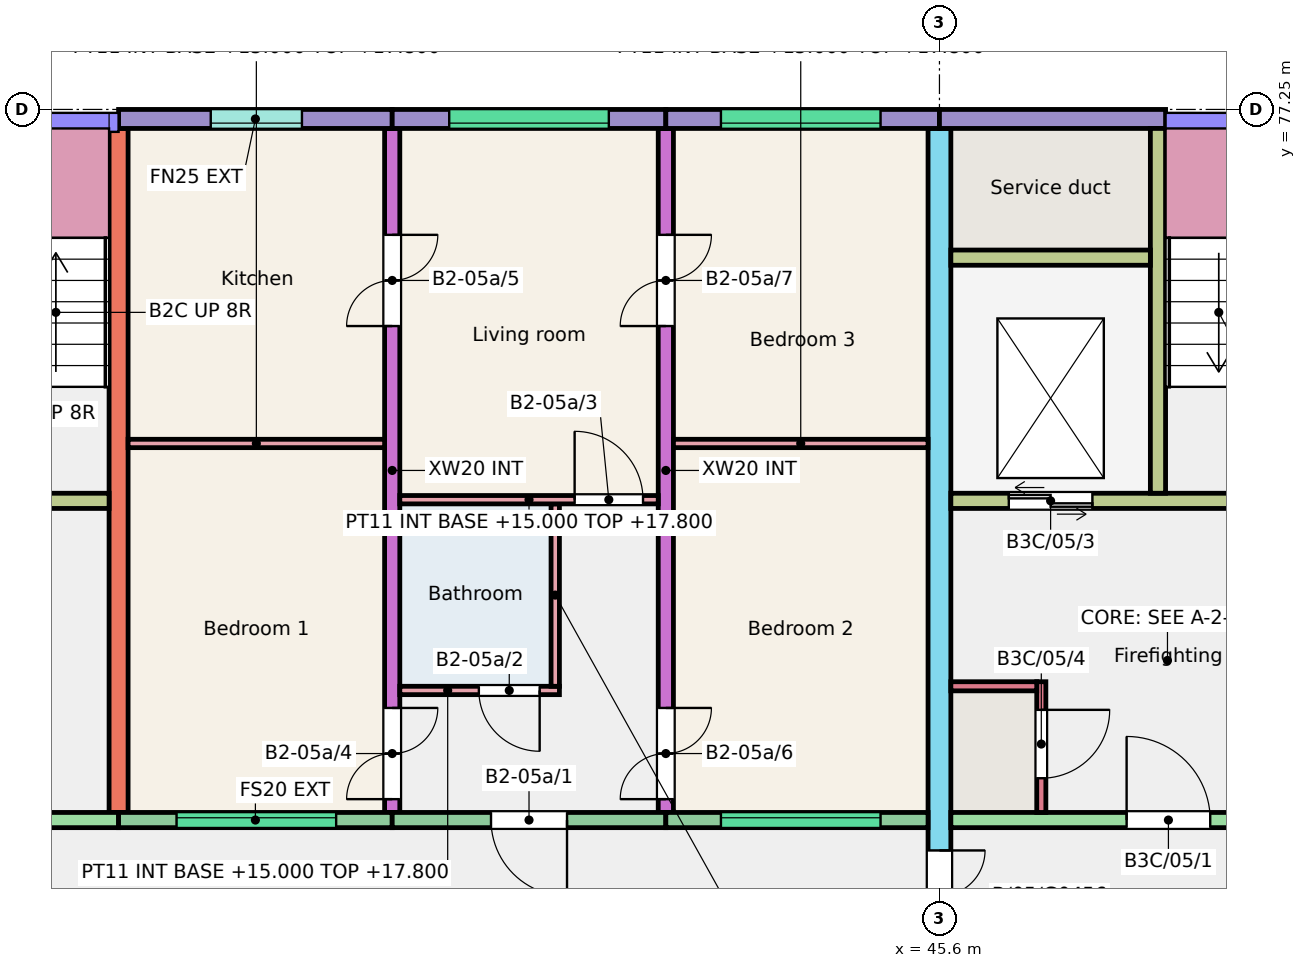
"""IFC4 building model, lengths in metres.
Left out: names, types, materials, properties, quantities, classifications, styles, units other than length and angle.
Written with IfcOpenShell. Run it as: python <this file> out.ifc"""

import sys

from ifc_helpers import new_model, si_unit, direction, frame, frame_2d, origin, place, context, subcontext, project, spatial, rectangle, extrude, element, fill, save


model = new_model("IFC4")
c1 = context("Model", 3, precision=1e-05, world=origin(), true_north=direction((0.0, 1.0)))
c2 = subcontext(c1, "Body", "Model", "MODEL_VIEW")
j1 = project(units=[si_unit("LENGTHUNIT", "METRE"), si_unit("PLANEANGLEUNIT", "RADIAN")], contexts=[c1])
p1 = place(None, origin())
s1 = spatial("IfcSite", under=j1, at=p1, CompositionType="ELEMENT")
p2 = place(p1, origin())
s2 = spatial("IfcBuilding", under=s1, at=p2, CompositionType="ELEMENT")
p3 = place(p2, frame((0.0, 0.0, 15.0)))
s3 = spatial("IfcBuildingStorey", under=s2, at=p3, CompositionType="ELEMENT", Elevation=15.0)
p4 = place(p3, frame((34.8, 68.0, 0.0), z_axis=(0.0, 0.0, 1.0), x_axis=(0.0, 1.0, 0.0)))
e1 = element("IfcWall", 1, at=p4, inside=s3, PredefinedType="SHEAR", context=c2, shape_type="SweptSolid", body=[
    extrude(rectangle(XDim=9.0, YDim=0.25, at=frame_2d((4.5, 0.0))), origin(), (0.0, 0.0, 1.0), 3.0),
])
p5 = place(p3, frame((38.4, 68.0, 0.0), z_axis=(0.0, 0.0, 1.0), x_axis=(0.0, 1.0, 0.0)))
e2 = element("IfcWall", 2, at=p5, inside=s3, PredefinedType="SHEAR", context=c2, shape_type="SweptSolid", body=[
    extrude(rectangle(XDim=9.0, YDim=0.2, at=frame_2d((4.5, 0.0))), origin(), (0.0, 0.0, 1.0), 3.0),
])
p6 = place(p5, frame((0.175, 0.0, 0.0)))
e3 = element("IfcOpeningElement", 3, at=p6, cuts=e2, PredefinedType="OPENING", context=c2, shape_type="SweptSolid", body=[
    extrude(rectangle(XDim=1.2, YDim=2.1, at=frame_2d((0.6, 1.05))), frame((0.0, 0.11, 0.0), z_axis=(0.0, -1.0, 0.0), x_axis=(1.0, 0.0, 0.0)), (0.0, 0.0, 1.0), 0.22),
])
p7 = place(p5, frame((6.4, 0.0, 0.0)))
e4 = element("IfcOpeningElement", 4, at=p7, cuts=e2, PredefinedType="OPENING", context=c2, shape_type="SweptSolid", body=[
    extrude(rectangle(XDim=1.2, YDim=2.1, at=frame_2d((0.6, 1.05))), frame((0.0, 0.11, 0.0), z_axis=(0.0, -1.0, 0.0), x_axis=(1.0, 0.0, 0.0)), (0.0, 0.0, 1.0), 0.22),
])
p8 = place(p3, frame((42.0, 68.0, 0.0), z_axis=(0.0, 0.0, 1.0), x_axis=(0.0, 1.0, 0.0)))
e5 = element("IfcWall", 5, at=p8, inside=s3, PredefinedType="SHEAR", context=c2, shape_type="SweptSolid", body=[
    extrude(rectangle(XDim=9.0, YDim=0.2, at=frame_2d((4.5, 0.0))), origin(), (0.0, 0.0, 1.0), 3.0),
])
p9 = place(p8, frame((0.175, 0.0, 0.0)))
e6 = element("IfcOpeningElement", 6, at=p9, cuts=e5, PredefinedType="OPENING", context=c2, shape_type="SweptSolid", body=[
    extrude(rectangle(XDim=1.2, YDim=2.1, at=frame_2d((0.6, 1.05))), frame((0.0, 0.11, 0.0), z_axis=(0.0, -1.0, 0.0), x_axis=(1.0, 0.0, 0.0)), (0.0, 0.0, 1.0), 0.22),
])
p10 = place(p8, frame((6.4, 0.0, 0.0)))
e7 = element("IfcOpeningElement", 7, at=p10, cuts=e5, PredefinedType="OPENING", context=c2, shape_type="SweptSolid", body=[
    extrude(rectangle(XDim=1.2, YDim=2.1, at=frame_2d((0.6, 1.05))), frame((0.0, 0.11, 0.0), z_axis=(0.0, -1.0, 0.0), x_axis=(1.0, 0.0, 0.0)), (0.0, 0.0, 1.0), 0.22),
])
p11 = place(p3, frame((45.6, 66.0, 0.0), z_axis=(0.0, 0.0, 1.0), x_axis=(0.0, 1.0, 0.0)))
e8 = element("IfcWall", 8, at=p11, inside=s3, PredefinedType="SHEAR", context=c2, shape_type="SweptSolid", body=[
    extrude(rectangle(XDim=11.0, YDim=0.3, at=frame_2d((5.5, 0.0))), origin(), (0.0, 0.0, 1.0), 3.0),
])
p12 = place(p11, frame((0.3, 0.0, 0.0)))
e9 = element("IfcOpeningElement", 9, at=p12, cuts=e8, PredefinedType="OPENING", context=c2, shape_type="SweptSolid", body=[
    extrude(rectangle(XDim=1.2, YDim=2.1, at=frame_2d((0.6, 1.05))), frame((0.0, 0.16, 0.0), z_axis=(0.0, -1.0, 0.0), x_axis=(1.0, 0.0, 0.0)), (0.0, 0.0, 1.0), 0.32),
])
p13 = place(p3, frame((28.95, 67.9, 0.0), z_axis=(0.0, 0.0, 1.0), x_axis=(1.0, 0.0, 0.0)))
e10 = element("IfcWall", 10, at=p13, inside=s3, PredefinedType="SHEAR", context=c2, shape_type="SweptSolid", body=[
    extrude(rectangle(XDim=5.85, YDim=0.2, at=frame_2d((2.925, 0.0))), origin(), (0.0, 0.0, 1.0), 3.0),
])
p14 = place(p13, frame((2.312, 0.0, 0.0)))
e11 = element("IfcOpeningElement", 11, at=p14, cuts=e10, PredefinedType="OPENING", context=c2, shape_type="SweptSolid", body=[
    extrude(rectangle(XDim=1.1, YDim=2.1, at=frame_2d((0.55, 1.05))), frame((0.0, 0.11, 0.0), z_axis=(0.0, -1.0, 0.0), x_axis=(1.0, 0.0, 0.0)), (0.0, 0.0, 1.0), 0.22),
])
p15 = place(p3, frame((28.95, 72.1, 0.0), z_axis=(0.0, 0.0, 1.0), x_axis=(1.0, 0.0, 0.0)))
e12 = element("IfcWall", 12, at=p15, inside=s3, PredefinedType="SHEAR", context=c2, shape_type="SweptSolid", body=[
    extrude(rectangle(XDim=5.725, YDim=0.2, at=frame_2d((2.863, 0.0))), origin(), (0.0, 0.0, 1.0), 3.0),
])
p16 = place(p15, frame((3.775, 0.0, 0.0)))
e13 = element("IfcOpeningElement", 13, at=p16, cuts=e12, PredefinedType="OPENING", context=c2, shape_type="SweptSolid", body=[
    extrude(rectangle(XDim=1.0, YDim=2.1, at=frame_2d((0.5, 1.05))), frame((0.0, 0.11, 0.0), z_axis=(0.0, -1.0, 0.0), x_axis=(1.0, 0.0, 0.0)), (0.0, 0.0, 1.0), 0.22),
])
p17 = place(p15, frame((0.762, 0.0, 0.0)))
e14 = element("IfcOpeningElement", 14, at=p17, cuts=e12, PredefinedType="OPENING", context=c2, shape_type="SweptSolid", body=[
    extrude(rectangle(XDim=1.1, YDim=2.1, at=frame_2d((0.55, 1.05))), frame((0.0, 0.11, 0.0), z_axis=(0.0, -1.0, 0.0), x_axis=(1.0, 0.0, 0.0)), (0.0, 0.0, 1.0), 0.22),
])
p18 = place(p3, frame((34.8, 77.125, 0.0), z_axis=(0.0, 0.0, 1.0), x_axis=(1.0, 0.0, 0.0)))
e15 = element("IfcWall", 15, at=p18, inside=s3, PredefinedType="SOLIDWALL", context=c2, shape_type="SweptSolid", body=[
    extrude(rectangle(XDim=3.6, YDim=0.25, at=frame_2d((1.8, 0.0))), origin(), (0.0, 0.0, 1.0), 3.0),
])
p19 = place(p18, frame((1.212, 0.0, 1.1)))
e16 = element("IfcOpeningElement", 16, at=p19, cuts=e15, PredefinedType="OPENING", context=c2, shape_type="SweptSolid", body=[
    extrude(rectangle(XDim=1.2, YDim=1.3, at=frame_2d((0.6, 0.65))), frame((0.0, 0.135, 0.0), z_axis=(0.0, -1.0, 0.0), x_axis=(1.0, 0.0, 0.0)), (0.0, 0.0, 1.0), 0.27),
])
p20 = place(p3, frame((34.8, 67.9, 0.0), z_axis=(0.0, 0.0, 1.0), x_axis=(1.0, 0.0, 0.0)))
e17 = element("IfcWall", 17, at=p20, inside=s3, PredefinedType="SOLIDWALL", context=c2, shape_type="SweptSolid", body=[
    extrude(rectangle(XDim=3.6, YDim=0.2, at=frame_2d((1.8, 0.0))), origin(), (0.0, 0.0, 1.0), 3.0),
])
p21 = place(p20, frame((0.762, 0.0, 1.2)))
e18 = element("IfcOpeningElement", 18, at=p21, cuts=e17, PredefinedType="OPENING", context=c2, shape_type="SweptSolid", body=[
    extrude(rectangle(XDim=2.1, YDim=1.2, at=frame_2d((1.05, 0.6))), frame((0.0, 0.11, 0.0), z_axis=(0.0, -1.0, 0.0), x_axis=(1.0, 0.0, 0.0)), (0.0, 0.0, 1.0), 0.22),
])
p22 = place(p3, frame((38.4, 77.125, 0.0), z_axis=(0.0, 0.0, 1.0), x_axis=(1.0, 0.0, 0.0)))
e19 = element("IfcWall", 19, at=p22, inside=s3, PredefinedType="SOLIDWALL", context=c2, shape_type="SweptSolid", body=[
    extrude(rectangle(XDim=3.6, YDim=0.25, at=frame_2d((1.8, 0.0))), origin(), (0.0, 0.0, 1.0), 3.0),
])
p23 = place(p22, frame((0.75, 0.0, 1.2)))
e20 = element("IfcOpeningElement", 20, at=p23, cuts=e19, PredefinedType="OPENING", context=c2, shape_type="SweptSolid", body=[
    extrude(rectangle(XDim=2.1, YDim=1.2, at=frame_2d((1.05, 0.6))), frame((0.0, 0.135, 0.0), z_axis=(0.0, -1.0, 0.0), x_axis=(1.0, 0.0, 0.0)), (0.0, 0.0, 1.0), 0.27),
])
p24 = place(p3, frame((38.4, 67.9, 0.0), z_axis=(0.0, 0.0, 1.0), x_axis=(1.0, 0.0, 0.0)))
e21 = element("IfcWall", 21, at=p24, inside=s3, PredefinedType="SOLIDWALL", context=c2, shape_type="SweptSolid", body=[
    extrude(rectangle(XDim=3.6, YDim=0.2, at=frame_2d((1.8, 0.0))), origin(), (0.0, 0.0, 1.0), 3.0),
])
p25 = place(p24, frame((1.3, 0.0, 0.0)))
e22 = element("IfcOpeningElement", 22, at=p25, cuts=e21, PredefinedType="OPENING", context=c2, shape_type="SweptSolid", body=[
    extrude(rectangle(XDim=1.0, YDim=2.1, at=frame_2d((0.5, 1.05))), frame((0.0, 0.11, 0.0), z_axis=(0.0, -1.0, 0.0), x_axis=(1.0, 0.0, 0.0)), (0.0, 0.0, 1.0), 0.22),
])
p26 = place(p3, frame((42.0, 77.125, 0.0), z_axis=(0.0, 0.0, 1.0), x_axis=(1.0, 0.0, 0.0)))
e23 = element("IfcWall", 23, at=p26, inside=s3, PredefinedType="SOLIDWALL", context=c2, shape_type="SweptSolid", body=[
    extrude(rectangle(XDim=3.6, YDim=0.25, at=frame_2d((1.8, 0.0))), origin(), (0.0, 0.0, 1.0), 3.0),
])
p27 = place(p26, frame((0.725, 0.0, 1.2)))
e24 = element("IfcOpeningElement", 24, at=p27, cuts=e23, PredefinedType="OPENING", context=c2, shape_type="SweptSolid", body=[
    extrude(rectangle(XDim=2.1, YDim=1.2, at=frame_2d((1.05, 0.6))), frame((0.0, 0.135, 0.0), z_axis=(0.0, -1.0, 0.0), x_axis=(1.0, 0.0, 0.0)), (0.0, 0.0, 1.0), 0.27),
])
p28 = place(p3, frame((42.0, 67.9, 0.0), z_axis=(0.0, 0.0, 1.0), x_axis=(1.0, 0.0, 0.0)))
e25 = element("IfcWall", 25, at=p28, inside=s3, PredefinedType="SOLIDWALL", context=c2, shape_type="SweptSolid", body=[
    extrude(rectangle(XDim=3.45, YDim=0.2, at=frame_2d((1.725, 0.0))), origin(), (0.0, 0.0, 1.0), 3.0),
])
p29 = place(p28, frame((0.725, 0.0, 1.2)))
e26 = element("IfcOpeningElement", 26, at=p29, cuts=e25, PredefinedType="OPENING", context=c2, shape_type="SweptSolid", body=[
    extrude(rectangle(XDim=2.1, YDim=1.2, at=frame_2d((1.05, 0.6))), frame((0.0, 0.11, 0.0), z_axis=(0.0, -1.0, 0.0), x_axis=(1.0, 0.0, 0.0)), (0.0, 0.0, 1.0), 0.22),
])
p30 = place(p3, frame((45.6, 77.125, 0.0), z_axis=(0.0, 0.0, 1.0), x_axis=(1.0, 0.0, 0.0)))
e27 = element("IfcWall", 27, at=p30, inside=s3, PredefinedType="SOLIDWALL", context=c2, shape_type="SweptSolid", body=[
    extrude(rectangle(XDim=2.975, YDim=0.25, at=frame_2d((1.487, 0.0))), origin(), (0.0, 0.0, 1.0), 3.0),
])
p31 = place(p3, frame((45.75, 67.9, 0.0), z_axis=(0.0, 0.0, 1.0), x_axis=(1.0, 0.0, 0.0)))
e28 = element("IfcWall", 28, at=p31, inside=s3, PredefinedType="SHEAR", context=c2, shape_type="SweptSolid", body=[
    extrude(rectangle(XDim=5.85, YDim=0.2, at=frame_2d((2.925, 0.0))), origin(), (0.0, 0.0, 1.0), 3.0),
])
p32 = place(p31, frame((2.312, 0.0, 0.0)))
e29 = element("IfcOpeningElement", 29, at=p32, cuts=e28, PredefinedType="OPENING", context=c2, shape_type="SweptSolid", body=[
    extrude(rectangle(XDim=1.1, YDim=2.1, at=frame_2d((0.55, 1.05))), frame((0.0, 0.11, 0.0), z_axis=(0.0, -1.0, 0.0), x_axis=(1.0, 0.0, 0.0)), (0.0, 0.0, 1.0), 0.22),
])
p33 = place(p3, frame((45.75, 72.1, 0.0), z_axis=(0.0, 0.0, 1.0), x_axis=(1.0, 0.0, 0.0)))
e30 = element("IfcWall", 30, at=p33, inside=s3, PredefinedType="SHEAR", context=c2, shape_type="SweptSolid", body=[
    extrude(rectangle(XDim=5.725, YDim=0.2, at=frame_2d((2.863, 0.0))), origin(), (0.0, 0.0, 1.0), 3.0),
])
p34 = place(p33, frame((3.775, 0.0, 0.0)))
e31 = element("IfcOpeningElement", 31, at=p34, cuts=e30, PredefinedType="OPENING", context=c2, shape_type="SweptSolid", body=[
    extrude(rectangle(XDim=1.0, YDim=2.1, at=frame_2d((0.5, 1.05))), frame((0.0, 0.11, 0.0), z_axis=(0.0, -1.0, 0.0), x_axis=(1.0, 0.0, 0.0)), (0.0, 0.0, 1.0), 0.22),
])
p35 = place(p33, frame((0.762, 0.0, 0.0)))
e32 = element("IfcOpeningElement", 32, at=p35, cuts=e30, PredefinedType="OPENING", context=c2, shape_type="SweptSolid", body=[
    extrude(rectangle(XDim=1.1, YDim=2.1, at=frame_2d((0.55, 1.05))), frame((0.0, 0.11, 0.0), z_axis=(0.0, -1.0, 0.0), x_axis=(1.0, 0.0, 0.0)), (0.0, 0.0, 1.0), 0.22),
])
p36 = place(p3, frame((48.475, 72.2, 0.0), z_axis=(0.0, 0.0, 1.0), x_axis=(0.0, 1.0, 0.0)))
e33 = element("IfcWall", 33, at=p36, inside=s3, PredefinedType="SHEAR", context=c2, shape_type="SweptSolid", body=[
    extrude(rectangle(XDim=4.8, YDim=0.2, at=frame_2d((2.4, 0.0))), origin(), (0.0, 0.0, 1.0), 3.0),
])
p37 = place(p3, frame((45.75, 75.3, 0.0), z_axis=(0.0, 0.0, 1.0), x_axis=(1.0, 0.0, 0.0)))
e34 = element("IfcWall", 34, at=p37, inside=s3, PredefinedType="SHEAR", context=c2, shape_type="SweptSolid", body=[
    extrude(rectangle(XDim=2.625, YDim=0.2, at=frame_2d((1.312, 0.0))), origin(), (0.0, 0.0, 1.0), 3.0),
])
p38 = place(p3, frame((46.94, 68.0, 0.0), z_axis=(0.0, 0.0, 1.0), x_axis=(0.0, 1.0, 0.0)))
e35 = element("IfcWall", 35, at=p38, inside=s3, PredefinedType="SHEAR", context=c2, shape_type="SweptSolid", body=[
    extrude(rectangle(XDim=1.72, YDim=0.12, at=frame_2d((0.86, 0.0))), origin(), (0.0, 0.0, 1.0), 3.0),
])
p39 = place(p38, frame((0.45, 0.0, 0.0)))
e36 = element("IfcOpeningElement", 36, at=p39, cuts=e35, PredefinedType="OPENING", context=c2, shape_type="SweptSolid", body=[
    extrude(rectangle(XDim=0.9, YDim=2.1, at=frame_2d((0.45, 1.05))), frame((0.0, 0.07, 0.0), z_axis=(0.0, -1.0, 0.0), x_axis=(1.0, 0.0, 0.0)), (0.0, 0.0, 1.0), 0.14),
])
p40 = place(p3, frame((45.75, 69.66, 0.0), z_axis=(0.0, 0.0, 1.0), x_axis=(1.0, 0.0, 0.0)))
e37 = element("IfcWall", 37, at=p40, inside=s3, PredefinedType="SHEAR", context=c2, shape_type="SweptSolid", body=[
    extrude(rectangle(XDim=1.13, YDim=0.12, at=frame_2d((0.565, 0.0))), origin(), (0.0, 0.0, 1.0), 3.0),
])
p41 = place(p3, frame((38.5, 69.605, 0.0), z_axis=(0.0, 0.0, 1.0), x_axis=(1.0, 0.0, 0.0)))
e38 = element("IfcWall", 38, at=p41, inside=s3, PredefinedType="PARTITIONING", context=c2, shape_type="SweptSolid", body=[
    extrude(rectangle(XDim=2.1, YDim=0.11, at=frame_2d((1.05, 0.0))), origin(), (0.0, 0.0, 1.0), 2.8),
])
p42 = place(p41, frame((1.04, 0.0, 0.0)))
e39 = element("IfcOpeningElement", 39, at=p42, cuts=e38, PredefinedType="OPENING", context=c2, shape_type="SweptSolid", body=[
    extrude(rectangle(XDim=0.8, YDim=2.1, at=frame_2d((0.4, 1.05))), frame((0.0, 0.065, 0.0), z_axis=(0.0, -1.0, 0.0), x_axis=(1.0, 0.0, 0.0)), (0.0, 0.0, 1.0), 0.13),
])
p43 = place(p3, frame((40.545, 69.66, 0.0), z_axis=(0.0, 0.0, 1.0), x_axis=(0.0, 1.0, 0.0)))
e40 = element("IfcWall", 40, at=p43, inside=s3, PredefinedType="PARTITIONING", context=c2, shape_type="SweptSolid", body=[
    extrude(rectangle(XDim=2.4, YDim=0.11, at=frame_2d((1.2, 0.0))), origin(), (0.0, 0.0, 1.0), 2.8),
])
p44 = place(p3, frame((38.5, 72.115, 0.0), z_axis=(0.0, 0.0, 1.0), x_axis=(1.0, 0.0, 0.0)))
e41 = element("IfcWall", 41, at=p44, inside=s3, PredefinedType="PARTITIONING", context=c2, shape_type="SweptSolid", body=[
    extrude(rectangle(XDim=3.4, YDim=0.11, at=frame_2d((1.7, 0.0))), origin(), (0.0, 0.0, 1.0), 2.8),
])
p45 = place(p44, frame((2.3, 0.0, 0.0)))
e42 = element("IfcOpeningElement", 42, at=p45, cuts=e41, PredefinedType="OPENING", context=c2, shape_type="SweptSolid", body=[
    extrude(rectangle(XDim=0.9, YDim=2.1, at=frame_2d((0.45, 1.05))), frame((0.0, 0.065, 0.0), z_axis=(0.0, -1.0, 0.0), x_axis=(1.0, 0.0, 0.0)), (0.0, 0.0, 1.0), 0.13),
])
p46 = place(p3, frame((34.925, 72.855, 0.0), z_axis=(0.0, 0.0, 1.0), x_axis=(1.0, 0.0, 0.0)))
e43 = element("IfcWall", 43, at=p46, inside=s3, PredefinedType="PARTITIONING", context=c2, shape_type="SweptSolid", body=[
    extrude(rectangle(XDim=3.375, YDim=0.11, at=frame_2d((1.688, 0.0))), origin(), (0.0, 0.0, 1.0), 2.8),
])
p47 = place(p3, frame((42.1, 72.855, 0.0), z_axis=(0.0, 0.0, 1.0), x_axis=(1.0, 0.0, 0.0)))
e44 = element("IfcWall", 44, at=p47, inside=s3, PredefinedType="PARTITIONING", context=c2, shape_type="SweptSolid", body=[
    extrude(rectangle(XDim=3.35, YDim=0.11, at=frame_2d((1.675, 0.0))), origin(), (0.0, 0.0, 1.0), 2.8),
])
p48 = place(p21, origin())
e45 = element("IfcWindow", 45, at=p48, inside=s3, PartitioningType="SINGLE_PANEL", PredefinedType="WINDOW", context=c2, shape_type="SweptSolid", body=[
    extrude(rectangle(XDim=2.1, YDim=1.2, at=frame_2d((1.05, 0.6))), frame((0.0, 0.06, 0.0), z_axis=(0.0, -1.0, 0.0), x_axis=(1.0, 0.0, 0.0)), (0.0, 0.0, 1.0), 0.06),
])
fill(e18, e45)
p49 = place(p19, origin())
e46 = element("IfcWindow", 46, at=p49, inside=s3, PartitioningType="SINGLE_PANEL", PredefinedType="WINDOW", context=c2, shape_type="SweptSolid", body=[
    extrude(rectangle(XDim=1.2, YDim=1.3, at=frame_2d((0.6, 0.65))), frame((0.0, -0.025, 0.0), z_axis=(0.0, -1.0, 0.0), x_axis=(1.0, 0.0, 0.0)), (0.0, 0.0, 1.0), 0.06),
])
fill(e16, e46)
p50 = place(p29, origin())
e47 = element("IfcWindow", 47, at=p50, inside=s3, PartitioningType="SINGLE_PANEL", PredefinedType="WINDOW", context=c2, shape_type="SweptSolid", body=[
    extrude(rectangle(XDim=2.1, YDim=1.2, at=frame_2d((1.05, 0.6))), frame((0.0, 0.06, 0.0), z_axis=(0.0, -1.0, 0.0), x_axis=(1.0, 0.0, 0.0)), (0.0, 0.0, 1.0), 0.06),
])
fill(e26, e47)
p51 = place(p27, origin())
e48 = element("IfcWindow", 48, at=p51, inside=s3, PartitioningType="SINGLE_PANEL", PredefinedType="WINDOW", context=c2, shape_type="SweptSolid", body=[
    extrude(rectangle(XDim=2.1, YDim=1.2, at=frame_2d((1.05, 0.6))), frame((0.0, -0.025, 0.0), z_axis=(0.0, -1.0, 0.0), x_axis=(1.0, 0.0, 0.0)), (0.0, 0.0, 1.0), 0.06),
])
fill(e24, e48)
p52 = place(p23, origin())
e49 = element("IfcWindow", 49, at=p52, inside=s3, PartitioningType="SINGLE_PANEL", PredefinedType="WINDOW", context=c2, shape_type="SweptSolid", body=[
    extrude(rectangle(XDim=2.1, YDim=1.2, at=frame_2d((1.05, 0.6))), frame((0.0, -0.025, 0.0), z_axis=(0.0, -1.0, 0.0), x_axis=(1.0, 0.0, 0.0)), (0.0, 0.0, 1.0), 0.06),
])
fill(e20, e49)
p53 = place(p25, origin())
e50 = element("IfcDoor", 50, at=p53, inside=s3, OperationType="SINGLE_SWING_RIGHT", PredefinedType="DOOR", context=c2, shape_type="SweptSolid", body=[
    extrude(rectangle(XDim=1.0, YDim=2.1, at=frame_2d((0.5, 1.05))), frame((0.0, 0.025, 0.0), z_axis=(0.0, -1.0, 0.0), x_axis=(1.0, 0.0, 0.0)), (0.0, 0.0, 1.0), 0.05),
])
fill(e22, e50)
p54 = place(p42, origin())
e51 = element("IfcDoor", 51, at=p54, inside=s3, OperationType="SINGLE_SWING_RIGHT", PredefinedType="DOOR", context=c2, shape_type="SweptSolid", body=[
    extrude(rectangle(XDim=0.8, YDim=2.1, at=frame_2d((0.4, 1.05))), frame((0.0, 0.025, 0.0), z_axis=(0.0, -1.0, 0.0), x_axis=(1.0, 0.0, 0.0)), (0.0, 0.0, 1.0), 0.05),
])
fill(e39, e51)
p55 = place(p45, origin())
e52 = element("IfcDoor", 52, at=p55, inside=s3, OperationType="SINGLE_SWING_LEFT", PredefinedType="DOOR", context=c2, shape_type="SweptSolid", body=[
    extrude(rectangle(XDim=0.9, YDim=2.1, at=frame_2d((0.45, 1.05))), frame((0.0, 0.025, 0.0), z_axis=(0.0, -1.0, 0.0), x_axis=(1.0, 0.0, 0.0)), (0.0, 0.0, 1.0), 0.05),
])
fill(e42, e52)
p56 = place(p6, origin())
e53 = element("IfcDoor", 53, at=p56, inside=s3, OperationType="DOUBLE_DOOR_SINGLE_SWING", PredefinedType="DOOR", context=c2, shape_type="SweptSolid", body=[
    extrude(rectangle(XDim=1.2, YDim=2.1, at=frame_2d((0.6, 1.05))), frame((0.0, 0.025, 0.0), z_axis=(0.0, -1.0, 0.0), x_axis=(1.0, 0.0, 0.0)), (0.0, 0.0, 1.0), 0.05),
])
fill(e3, e53)
p57 = place(p7, origin())
e54 = element("IfcDoor", 54, at=p57, inside=s3, OperationType="DOUBLE_DOOR_SINGLE_SWING", PredefinedType="DOOR", context=c2, shape_type="SweptSolid", body=[
    extrude(rectangle(XDim=1.2, YDim=2.1, at=frame_2d((0.6, 1.05))), frame((0.0, 0.025, 0.0), z_axis=(0.0, -1.0, 0.0), x_axis=(1.0, 0.0, 0.0)), (0.0, 0.0, 1.0), 0.05),
])
fill(e4, e54)
p58 = place(p9, origin())
e55 = element("IfcDoor", 55, at=p58, inside=s3, OperationType="DOUBLE_DOOR_SINGLE_SWING", PredefinedType="DOOR", context=c2, shape_type="SweptSolid", body=[
    extrude(rectangle(XDim=1.2, YDim=2.1, at=frame_2d((0.6, 1.05))), frame((0.0, 0.025, 0.0), z_axis=(0.0, -1.0, 0.0), x_axis=(1.0, 0.0, 0.0)), (0.0, 0.0, 1.0), 0.05),
])
fill(e6, e55)
p59 = place(p10, origin())
e56 = element("IfcDoor", 56, at=p59, inside=s3, OperationType="DOUBLE_DOOR_SINGLE_SWING", PredefinedType="DOOR", context=c2, shape_type="SweptSolid", body=[
    extrude(rectangle(XDim=1.2, YDim=2.1, at=frame_2d((0.6, 1.05))), frame((0.0, 0.025, 0.0), z_axis=(0.0, -1.0, 0.0), x_axis=(1.0, 0.0, 0.0)), (0.0, 0.0, 1.0), 0.05),
])
fill(e7, e56)
p60 = place(p32, origin())
e57 = element("IfcDoor", 57, at=p60, inside=s3, OperationType="SINGLE_SWING_LEFT", PredefinedType="DOOR", context=c2, shape_type="SweptSolid", body=[
    extrude(rectangle(XDim=1.1, YDim=2.1, at=frame_2d((0.55, 1.05))), frame((0.0, 0.025, 0.0), z_axis=(0.0, -1.0, 0.0), x_axis=(1.0, 0.0, 0.0)), (0.0, 0.0, 1.0), 0.05),
])
fill(e29, e57)
p61 = place(p35, origin())
e58 = element("IfcDoor", 58, at=p61, inside=s3, OperationType="DOUBLE_DOOR_SLIDING", PredefinedType="DOOR", context=c2, shape_type="SweptSolid", body=[
    extrude(rectangle(XDim=1.1, YDim=2.1, at=frame_2d((0.55, 1.05))), frame((0.0, 0.025, 0.0), z_axis=(0.0, -1.0, 0.0), x_axis=(1.0, 0.0, 0.0)), (0.0, 0.0, 1.0), 0.05),
])
fill(e32, e58)
p62 = place(p39, origin())
e59 = element("IfcDoor", 59, at=p62, inside=s3, OperationType="SINGLE_SWING_RIGHT", PredefinedType="DOOR", context=c2, shape_type="SweptSolid", body=[
    extrude(rectangle(XDim=0.9, YDim=2.1, at=frame_2d((0.45, 1.05))), frame((0.0, 0.025, 0.0), z_axis=(0.0, -1.0, 0.0), x_axis=(1.0, 0.0, 0.0)), (0.0, 0.0, 1.0), 0.05),
])
fill(e36, e59)
p63 = place(p12, origin())
e60 = element("IfcDoor", 60, at=p63, inside=s3, OperationType="DOUBLE_DOOR_SINGLE_SWING", PredefinedType="DOOR", context=c2, shape_type="SweptSolid", body=[
    extrude(rectangle(XDim=1.2, YDim=2.1, at=frame_2d((0.6, 1.05))), frame((0.0, 0.025, 0.0), z_axis=(0.0, -1.0, 0.0), x_axis=(1.0, 0.0, 0.0)), (0.0, 0.0, 1.0), 0.05),
])
fill(e9, e60)
save(model, sys.argv[1])
